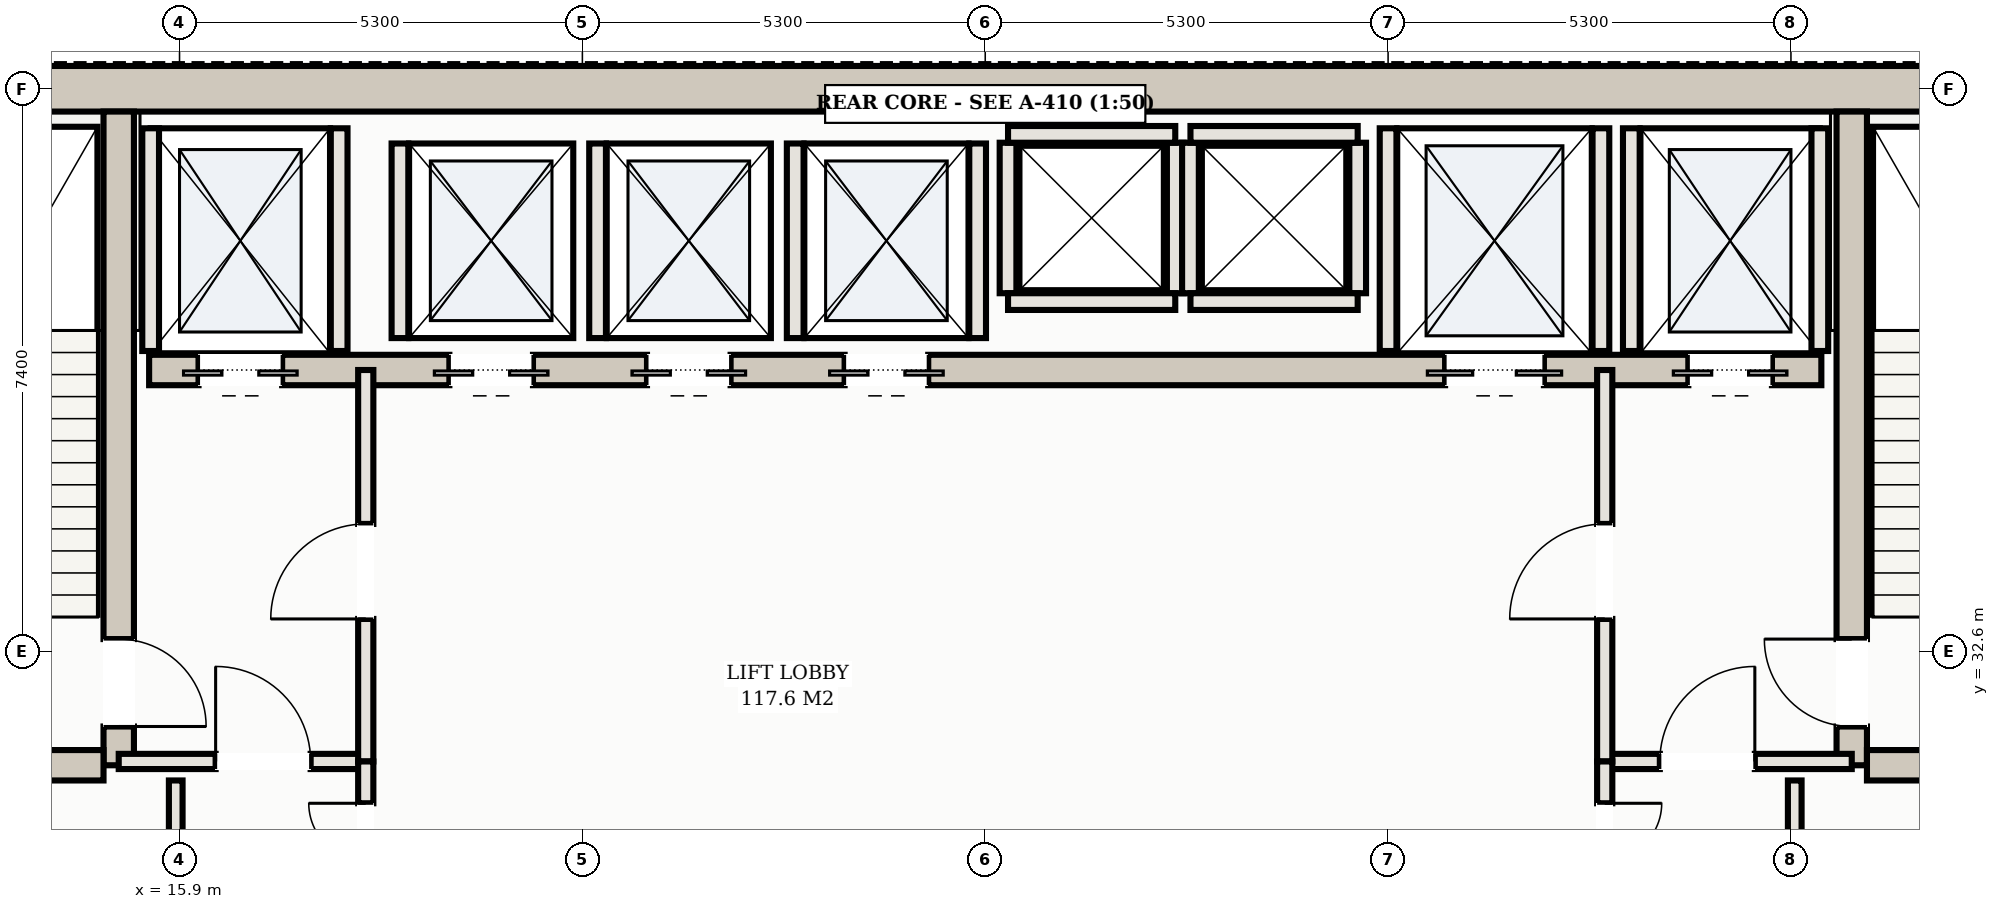
"""IFC4 building model, lengths in metres.
Left out: names, types, materials, properties, quantities, classifications, styles, units other than length and angle.
Written with IfcOpenShell. Run it as: python <this file> out.ifc"""

import sys

from ifc_helpers import new_model, si_unit, direction, frame, frame_2d, origin, place, context, subcontext, project, spatial, rectangle, extrude, element, fill, save


model = new_model("IFC4")
c1 = context("Model", 3, precision=1e-05, world=origin(), true_north=direction((0.0, 1.0)))
c2 = subcontext(c1, "Body", "Model", "MODEL_VIEW")
j1 = project(units=[si_unit("LENGTHUNIT", "METRE"), si_unit("PLANEANGLEUNIT", "RADIAN")], contexts=[c1])
p1 = place(None, origin())
s1 = spatial("IfcSite", under=j1, at=p1, CompositionType="ELEMENT")
p2 = place(p1, origin())
s2 = spatial("IfcBuilding", under=s1, at=p2, CompositionType="ELEMENT")
p3 = place(p2, frame((0.0, 0.0, 134.7)))
s3 = spatial("IfcBuildingStorey", under=s2, at=p3, CompositionType="ELEMENT", Elevation=134.7)
p4 = place(p3, frame((10.3, 40.0, 0.0), z_axis=(0.0, 0.0, 1.0), x_axis=(1.0, 0.0, 0.0)))
e1 = element("IfcWall", 1, at=p4, inside=s3, PredefinedType="SHEAR", context=c2, shape_type="SweptSolid", body=[
    extrude(rectangle(XDim=32.4, YDim=0.6, at=frame_2d((16.2, 0.0))), origin(), (0.0, 0.0, 1.0), 4.3),
])
p5 = place(p3, frame((15.1, 31.1, 0.0), z_axis=(0.0, 0.0, 1.0), x_axis=(0.0, 1.0, 0.0)))
e2 = element("IfcWall", 2, at=p5, inside=s3, PredefinedType="SHEAR", context=c2, shape_type="SweptSolid", body=[
    extrude(rectangle(XDim=8.6, YDim=0.4, at=frame_2d((4.3, 0.0))), origin(), (0.0, 0.0, 1.0), 4.3),
])
p6 = place(p5, frame((0.51, 0.0, 0.0)))
e3 = element("IfcOpeningElement", 3, at=p6, cuts=e2, PredefinedType="OPENING", context=c2, shape_type="SweptSolid", body=[
    extrude(rectangle(XDim=1.15, YDim=2.2, at=frame_2d((0.575, 1.1))), frame((0.0, 0.21, 0.0), z_axis=(0.0, -1.0, 0.0), x_axis=(1.0, 0.0, 0.0)), (0.0, 0.0, 1.0), 0.42),
])
p7 = place(p3, frame((10.9, 31.1, 0.0), z_axis=(0.0, 0.0, 1.0), x_axis=(1.0, 0.0, 0.0)))
e4 = element("IfcWall", 4, at=p7, inside=s3, PredefinedType="SHEAR", context=c2, shape_type="SweptSolid", body=[
    extrude(rectangle(XDim=4.0, YDim=0.4, at=frame_2d((2.0, 0.0))), origin(), (0.0, 0.0, 1.0), 4.3),
])
p8 = place(p3, frame((37.9, 31.1, 0.0), z_axis=(0.0, 0.0, 1.0), x_axis=(0.0, 1.0, 0.0)))
e5 = element("IfcWall", 5, at=p8, inside=s3, PredefinedType="SHEAR", context=c2, shape_type="SweptSolid", body=[
    extrude(rectangle(XDim=8.6, YDim=0.4, at=frame_2d((4.3, 0.0))), origin(), (0.0, 0.0, 1.0), 4.3),
])
p9 = place(p8, frame((0.51, 0.0, 0.0)))
e6 = element("IfcOpeningElement", 6, at=p9, cuts=e5, PredefinedType="OPENING", context=c2, shape_type="SweptSolid", body=[
    extrude(rectangle(XDim=1.15, YDim=2.2, at=frame_2d((0.575, 1.1))), frame((0.0, 0.21, 0.0), z_axis=(0.0, -1.0, 0.0), x_axis=(1.0, 0.0, 0.0)), (0.0, 0.0, 1.0), 0.42),
])
p10 = place(p3, frame((38.1, 31.1, 0.0), z_axis=(0.0, 0.0, 1.0), x_axis=(1.0, 0.0, 0.0)))
e7 = element("IfcWall", 7, at=p10, inside=s3, PredefinedType="SHEAR", context=c2, shape_type="SweptSolid", body=[
    extrude(rectangle(XDim=4.0, YDim=0.4, at=frame_2d((2.0, 0.0))), origin(), (0.0, 0.0, 1.0), 4.3),
])
p11 = place(p3, frame((15.5, 36.3, 0.0), z_axis=(0.0, 0.0, 1.0), x_axis=(1.0, 0.0, 0.0)))
e8 = element("IfcWall", 8, at=p11, inside=s3, PredefinedType="SHEAR", context=c2, shape_type="SweptSolid", body=[
    extrude(rectangle(XDim=22.0, YDim=0.4, at=frame_2d((11.0, 0.0))), origin(), (0.0, 0.0, 1.0), 4.3),
])
p12 = place(p11, frame((0.65, 0.0, 0.0)))
e9 = element("IfcOpeningElement", 9, at=p12, cuts=e8, PredefinedType="OPENING", context=c2, shape_type="SweptSolid", body=[
    extrude(rectangle(XDim=1.1, YDim=2.15, at=frame_2d((0.55, 1.075))), frame((0.0, 0.21, 0.0), z_axis=(0.0, -1.0, 0.0), x_axis=(1.0, 0.0, 0.0)), (0.0, 0.0, 1.0), 0.42),
])
p13 = place(p11, frame((20.25, 0.0, 0.0)))
e10 = element("IfcOpeningElement", 10, at=p13, cuts=e8, PredefinedType="OPENING", context=c2, shape_type="SweptSolid", body=[
    extrude(rectangle(XDim=1.1, YDim=2.15, at=frame_2d((0.55, 1.075))), frame((0.0, 0.21, 0.0), z_axis=(0.0, -1.0, 0.0), x_axis=(1.0, 0.0, 0.0)), (0.0, 0.0, 1.0), 0.42),
])
p14 = place(p11, frame((17.05, 0.0, 0.0)))
e11 = element("IfcOpeningElement", 11, at=p14, cuts=e8, PredefinedType="OPENING", context=c2, shape_type="SweptSolid", body=[
    extrude(rectangle(XDim=1.3, YDim=2.2, at=frame_2d((0.65, 1.1))), frame((0.0, 0.21, 0.0), z_axis=(0.0, -1.0, 0.0), x_axis=(1.0, 0.0, 0.0)), (0.0, 0.0, 1.0), 0.42),
])
p15 = place(p11, frame((3.95, 0.0, 0.0)))
e12 = element("IfcOpeningElement", 12, at=p15, cuts=e8, PredefinedType="OPENING", context=c2, shape_type="SweptSolid", body=[
    extrude(rectangle(XDim=1.1, YDim=2.15, at=frame_2d((0.55, 1.075))), frame((0.0, 0.21, 0.0), z_axis=(0.0, -1.0, 0.0), x_axis=(1.0, 0.0, 0.0)), (0.0, 0.0, 1.0), 0.42),
])
p16 = place(p11, frame((6.55, 0.0, 0.0)))
e13 = element("IfcOpeningElement", 13, at=p16, cuts=e8, PredefinedType="OPENING", context=c2, shape_type="SweptSolid", body=[
    extrude(rectangle(XDim=1.1, YDim=2.15, at=frame_2d((0.55, 1.075))), frame((0.0, 0.21, 0.0), z_axis=(0.0, -1.0, 0.0), x_axis=(1.0, 0.0, 0.0)), (0.0, 0.0, 1.0), 0.42),
])
p17 = place(p11, frame((9.15, 0.0, 0.0)))
e14 = element("IfcOpeningElement", 14, at=p17, cuts=e8, PredefinedType="OPENING", context=c2, shape_type="SweptSolid", body=[
    extrude(rectangle(XDim=1.1, YDim=2.15, at=frame_2d((0.55, 1.075))), frame((0.0, 0.21, 0.0), z_axis=(0.0, -1.0, 0.0), x_axis=(1.0, 0.0, 0.0)), (0.0, 0.0, 1.0), 0.42),
])
for number, where, z_axis, x_axis in (
    (15, (15.52, 36.55, 0.0), (0.0, 0.0, 1.0), (0.0, 1.0, 0.0)),
    (16, (18.0, 36.55, 0.0), (0.0, 0.0, 1.0), (0.0, 1.0, 0.0)),
    (17, (35.0, 36.55, 0.0), (0.0, 0.0, 1.0), (0.0, 1.0, 0.0)),
    (18, (37.48, 36.55, 0.0), (0.0, 0.0, 1.0), (0.0, 1.0, 0.0)),
    (19, (31.8, 36.55, 0.0), (0.0, 0.0, 1.0), (0.0, 1.0, 0.0)),
    (20, (34.6, 36.55, 0.0), (0.0, 0.0, 1.0), (0.0, 1.0, 0.0)),
):
    element("IfcWall", number, at=place(p3, frame(where, z_axis=z_axis, x_axis=x_axis)), inside=s3, PredefinedType="SOLIDWALL", context=c2, shape_type="SweptSolid", body=[
        extrude(rectangle(XDim=2.93, YDim=0.22, at=frame_2d((1.465, 0.0))), origin(), (0.0, 0.0, 1.0), 4.3),
    ])
for number, where, z_axis, x_axis in (
    (21, (18.8, 36.72, 0.0), (0.0, 0.0, 1.0), (0.0, 1.0, 0.0)),
    (22, (21.4, 36.72, 0.0), (0.0, 0.0, 1.0), (0.0, 1.0, 0.0)),
    (23, (24.0, 36.72, 0.0), (0.0, 0.0, 1.0), (0.0, 1.0, 0.0)),
    (24, (26.4, 36.72, 0.0), (0.0, 0.0, 1.0), (0.0, 1.0, 0.0)),
):
    element("IfcWall", number, at=place(p3, frame(where, z_axis=z_axis, x_axis=x_axis)), inside=s3, PredefinedType="SOLIDWALL", context=c2, shape_type="SweptSolid", body=[
        extrude(rectangle(XDim=2.56, YDim=0.22, at=frame_2d((1.28, 0.0))), origin(), (0.0, 0.0, 1.0), 4.3),
    ])
for number, where, z_axis, x_axis in (
    (25, (26.8, 37.31, 0.0), (0.0, 0.0, 1.0), (0.0, 1.0, 0.0)),
    (26, (29.0, 37.31, 0.0), (0.0, 0.0, 1.0), (0.0, 1.0, 0.0)),
):
    element("IfcWall", number, at=place(p3, frame(where, z_axis=z_axis, x_axis=x_axis)), inside=s3, PredefinedType="SOLIDWALL", context=c2, shape_type="SweptSolid", body=[
        extrude(rectangle(XDim=1.98, YDim=0.22, at=frame_2d((0.99, 0.0))), origin(), (0.0, 0.0, 1.0), 4.3),
    ])
for number, where, z_axis, x_axis in (
    (27, (26.8, 39.4, 0.0), (0.0, 0.0, 1.0), (1.0, 0.0, 0.0)),
    (28, (26.8, 37.2, 0.0), (0.0, 0.0, 1.0), (1.0, 0.0, 0.0)),
):
    element("IfcWall", number, at=place(p3, frame(where, z_axis=z_axis, x_axis=x_axis)), inside=s3, PredefinedType="SOLIDWALL", context=c2, shape_type="SweptSolid", body=[
        extrude(rectangle(XDim=2.2, YDim=0.22, at=frame_2d((1.1, 0.0))), origin(), (0.0, 0.0, 1.0), 4.3),
    ])
for number, where, z_axis, x_axis in (
    (29, (29.2, 37.31, 0.0), (0.0, 0.0, 1.0), (0.0, 1.0, 0.0)),
    (30, (31.4, 37.31, 0.0), (0.0, 0.0, 1.0), (0.0, 1.0, 0.0)),
):
    element("IfcWall", number, at=place(p3, frame(where, z_axis=z_axis, x_axis=x_axis)), inside=s3, PredefinedType="SOLIDWALL", context=c2, shape_type="SweptSolid", body=[
        extrude(rectangle(XDim=1.98, YDim=0.22, at=frame_2d((0.99, 0.0))), origin(), (0.0, 0.0, 1.0), 4.3),
    ])
for number, where, z_axis, x_axis in (
    (31, (29.2, 39.4, 0.0), (0.0, 0.0, 1.0), (1.0, 0.0, 0.0)),
    (32, (29.2, 37.2, 0.0), (0.0, 0.0, 1.0), (1.0, 0.0, 0.0)),
):
    element("IfcWall", number, at=place(p3, frame(where, z_axis=z_axis, x_axis=x_axis)), inside=s3, PredefinedType="SOLIDWALL", context=c2, shape_type="SweptSolid", body=[
        extrude(rectangle(XDim=2.2, YDim=0.22, at=frame_2d((1.1, 0.0))), origin(), (0.0, 0.0, 1.0), 4.3),
    ])
p18 = place(p3, frame((15.1, 31.15, 0.0), z_axis=(0.0, 0.0, 1.0), x_axis=(1.0, 0.0, 0.0)))
e33 = element("IfcWall", 33, at=p18, inside=s3, PredefinedType="PARTITIONING", context=c2, shape_type="SweptSolid", body=[
    extrude(rectangle(XDim=3.25, YDim=0.2, at=frame_2d((1.625, 0.0))), origin(), (0.0, 0.0, 1.0), 4.3),
])
p19 = place(p18, frame((1.275, 0.0, 0.0)))
e34 = element("IfcOpeningElement", 34, at=p19, cuts=e33, PredefinedType="OPENING", context=c2, shape_type="SweptSolid", body=[
    extrude(rectangle(XDim=1.25, YDim=2.2, at=frame_2d((0.625, 1.1))), frame((0.0, 0.11, 0.0), z_axis=(0.0, -1.0, 0.0), x_axis=(1.0, 0.0, 0.0)), (0.0, 0.0, 1.0), 0.22),
])
p20 = place(p3, frame((18.35, 31.15, 0.0), z_axis=(0.0, 0.0, 1.0), x_axis=(0.0, 1.0, 0.0)))
e35 = element("IfcWall", 35, at=p20, inside=s3, PredefinedType="PARTITIONING", context=c2, shape_type="SweptSolid", body=[
    extrude(rectangle(XDim=5.15, YDim=0.2, at=frame_2d((2.575, 0.0))), origin(), (0.0, 0.0, 1.0), 4.3),
])
p21 = place(p20, frame((1.875, 0.0, 0.0)))
e36 = element("IfcOpeningElement", 36, at=p21, cuts=e35, PredefinedType="OPENING", context=c2, shape_type="SweptSolid", body=[
    extrude(rectangle(XDim=1.25, YDim=2.2, at=frame_2d((0.625, 1.1))), frame((0.0, 0.11, 0.0), z_axis=(0.0, -1.0, 0.0), x_axis=(1.0, 0.0, 0.0)), (0.0, 0.0, 1.0), 0.22),
])
p22 = place(p3, frame((34.65, 31.15, 0.0), z_axis=(0.0, 0.0, 1.0), x_axis=(1.0, 0.0, 0.0)))
e37 = element("IfcWall", 37, at=p22, inside=s3, PredefinedType="PARTITIONING", context=c2, shape_type="SweptSolid", body=[
    extrude(rectangle(XDim=3.25, YDim=0.2, at=frame_2d((1.625, 0.0))), origin(), (0.0, 0.0, 1.0), 4.3),
])
p23 = place(p22, frame((0.725, 0.0, 0.0)))
e38 = element("IfcOpeningElement", 38, at=p23, cuts=e37, PredefinedType="OPENING", context=c2, shape_type="SweptSolid", body=[
    extrude(rectangle(XDim=1.25, YDim=2.2, at=frame_2d((0.625, 1.1))), frame((0.0, 0.11, 0.0), z_axis=(0.0, -1.0, 0.0), x_axis=(1.0, 0.0, 0.0)), (0.0, 0.0, 1.0), 0.22),
])
p24 = place(p3, frame((34.65, 31.15, 0.0), z_axis=(0.0, 0.0, 1.0), x_axis=(0.0, 1.0, 0.0)))
e39 = element("IfcWall", 39, at=p24, inside=s3, PredefinedType="PARTITIONING", context=c2, shape_type="SweptSolid", body=[
    extrude(rectangle(XDim=5.15, YDim=0.2, at=frame_2d((2.575, 0.0))), origin(), (0.0, 0.0, 1.0), 4.3),
])
p25 = place(p24, frame((1.875, 0.0, 0.0)))
e40 = element("IfcOpeningElement", 40, at=p25, cuts=e39, PredefinedType="OPENING", context=c2, shape_type="SweptSolid", body=[
    extrude(rectangle(XDim=1.25, YDim=2.2, at=frame_2d((0.625, 1.1))), frame((0.0, 0.11, 0.0), z_axis=(0.0, -1.0, 0.0), x_axis=(1.0, 0.0, 0.0)), (0.0, 0.0, 1.0), 0.22),
])
p26 = place(p3, frame((15.85, 25.5, 0.0), z_axis=(0.0, 0.0, 1.0), x_axis=(0.0, 1.0, 0.0)))
e41 = element("IfcWall", 41, at=p26, inside=s3, PredefinedType="PARTITIONING", context=c2, shape_type="SweptSolid", body=[
    extrude(rectangle(XDim=5.4, YDim=0.18, at=frame_2d((2.7, 0.0))), origin(), (0.0, 0.0, 1.0), 4.3),
])
p27 = place(p26, frame((2.24, 0.0, 0.0)))
e42 = element("IfcOpeningElement", 42, at=p27, cuts=e41, PredefinedType="OPENING", context=c2, shape_type="SweptSolid", body=[
    extrude(rectangle(XDim=0.92, YDim=2.15, at=frame_2d((0.46, 1.075))), frame((0.0, 0.1, 0.0), z_axis=(0.0, -1.0, 0.0), x_axis=(1.0, 0.0, 0.0)), (0.0, 0.0, 1.0), 0.2),
])
p28 = place(p3, frame((37.15, 25.5, 0.0), z_axis=(0.0, 0.0, 1.0), x_axis=(0.0, 1.0, 0.0)))
e43 = element("IfcWall", 43, at=p28, inside=s3, PredefinedType="PARTITIONING", context=c2, shape_type="SweptSolid", body=[
    extrude(rectangle(XDim=5.4, YDim=0.18, at=frame_2d((2.7, 0.0))), origin(), (0.0, 0.0, 1.0), 4.3),
])
p29 = place(p28, frame((2.24, 0.0, 0.0)))
e44 = element("IfcOpeningElement", 44, at=p29, cuts=e43, PredefinedType="OPENING", context=c2, shape_type="SweptSolid", body=[
    extrude(rectangle(XDim=0.92, YDim=2.15, at=frame_2d((0.46, 1.075))), frame((0.0, 0.1, 0.0), z_axis=(0.0, -1.0, 0.0), x_axis=(1.0, 0.0, 0.0)), (0.0, 0.0, 1.0), 0.2),
])
p30 = place(p3, frame((18.35, 28.55, 0.0), z_axis=(0.0, 0.0, 1.0), x_axis=(0.0, 1.0, 0.0)))
e45 = element("IfcWall", 45, at=p30, inside=s3, PredefinedType="PARTITIONING", context=c2, shape_type="SweptSolid", body=[
    extrude(rectangle(XDim=2.6, YDim=0.2, at=frame_2d((1.3, 0.0))), origin(), (0.0, 0.0, 1.0), 4.3),
])
p31 = place(p30, frame((0.55, 0.0, 0.0)))
e46 = element("IfcOpeningElement", 46, at=p31, cuts=e45, PredefinedType="OPENING", context=c2, shape_type="SweptSolid", body=[
    extrude(rectangle(XDim=1.5, YDim=2.25, at=frame_2d((0.75, 1.125))), frame((0.0, 0.11, 0.0), z_axis=(0.0, -1.0, 0.0), x_axis=(1.0, 0.0, 0.0)), (0.0, 0.0, 1.0), 0.22),
])
p32 = place(p3, frame((34.65, 28.55, 0.0), z_axis=(0.0, 0.0, 1.0), x_axis=(0.0, 1.0, 0.0)))
e47 = element("IfcWall", 47, at=p32, inside=s3, PredefinedType="PARTITIONING", context=c2, shape_type="SweptSolid", body=[
    extrude(rectangle(XDim=2.6, YDim=0.2, at=frame_2d((1.3, 0.0))), origin(), (0.0, 0.0, 1.0), 4.3),
])
p33 = place(p32, frame((0.55, 0.0, 0.0)))
e48 = element("IfcOpeningElement", 48, at=p33, cuts=e47, PredefinedType="OPENING", context=c2, shape_type="SweptSolid", body=[
    extrude(rectangle(XDim=1.5, YDim=2.25, at=frame_2d((0.75, 1.125))), frame((0.0, 0.11, 0.0), z_axis=(0.0, -1.0, 0.0), x_axis=(1.0, 0.0, 0.0)), (0.0, 0.0, 1.0), 0.22),
])
p34 = place(p12, frame((1.1, 0.0, 0.0), z_axis=(0.0, 0.0, 1.0), x_axis=(-1.0, 0.0, 0.0)))
e49 = element("IfcDoor", 49, at=p34, inside=s3, OperationType="DOUBLE_DOOR_SLIDING", PredefinedType="DOOR", context=c2, shape_type="SweptSolid", body=[
    extrude(rectangle(XDim=1.1, YDim=2.15, at=frame_2d((0.55, 1.075))), frame((0.0, 0.025, 0.0), z_axis=(0.0, -1.0, 0.0), x_axis=(1.0, 0.0, 0.0)), (0.0, 0.0, 1.0), 0.05),
])
fill(e9, e49)
p35 = place(p13, frame((1.1, 0.0, 0.0), z_axis=(0.0, 0.0, 1.0), x_axis=(-1.0, 0.0, 0.0)))
e50 = element("IfcDoor", 50, at=p35, inside=s3, OperationType="DOUBLE_DOOR_SLIDING", PredefinedType="DOOR", context=c2, shape_type="SweptSolid", body=[
    extrude(rectangle(XDim=1.1, YDim=2.15, at=frame_2d((0.55, 1.075))), frame((0.0, 0.025, 0.0), z_axis=(0.0, -1.0, 0.0), x_axis=(1.0, 0.0, 0.0)), (0.0, 0.0, 1.0), 0.05),
])
fill(e10, e50)
p36 = place(p14, frame((1.3, 0.0, 0.0), z_axis=(0.0, 0.0, 1.0), x_axis=(-1.0, 0.0, 0.0)))
e51 = element("IfcDoor", 51, at=p36, inside=s3, OperationType="DOUBLE_DOOR_SLIDING", PredefinedType="DOOR", context=c2, shape_type="SweptSolid", body=[
    extrude(rectangle(XDim=1.3, YDim=2.2, at=frame_2d((0.65, 1.1))), frame((0.0, 0.025, 0.0), z_axis=(0.0, -1.0, 0.0), x_axis=(1.0, 0.0, 0.0)), (0.0, 0.0, 1.0), 0.05),
])
fill(e11, e51)
p37 = place(p15, frame((1.1, 0.0, 0.0), z_axis=(0.0, 0.0, 1.0), x_axis=(-1.0, 0.0, 0.0)))
e52 = element("IfcDoor", 52, at=p37, inside=s3, OperationType="DOUBLE_DOOR_SLIDING", PredefinedType="DOOR", context=c2, shape_type="SweptSolid", body=[
    extrude(rectangle(XDim=1.1, YDim=2.15, at=frame_2d((0.55, 1.075))), frame((0.0, 0.025, 0.0), z_axis=(0.0, -1.0, 0.0), x_axis=(1.0, 0.0, 0.0)), (0.0, 0.0, 1.0), 0.05),
])
fill(e12, e52)
p38 = place(p16, frame((1.1, 0.0, 0.0), z_axis=(0.0, 0.0, 1.0), x_axis=(-1.0, 0.0, 0.0)))
e53 = element("IfcDoor", 53, at=p38, inside=s3, OperationType="DOUBLE_DOOR_SLIDING", PredefinedType="DOOR", context=c2, shape_type="SweptSolid", body=[
    extrude(rectangle(XDim=1.1, YDim=2.15, at=frame_2d((0.55, 1.075))), frame((0.0, 0.025, 0.0), z_axis=(0.0, -1.0, 0.0), x_axis=(1.0, 0.0, 0.0)), (0.0, 0.0, 1.0), 0.05),
])
fill(e13, e53)
p39 = place(p17, frame((1.1, 0.0, 0.0), z_axis=(0.0, 0.0, 1.0), x_axis=(-1.0, 0.0, 0.0)))
e54 = element("IfcDoor", 54, at=p39, inside=s3, OperationType="DOUBLE_DOOR_SLIDING", PredefinedType="DOOR", context=c2, shape_type="SweptSolid", body=[
    extrude(rectangle(XDim=1.1, YDim=2.15, at=frame_2d((0.55, 1.075))), frame((0.0, 0.025, 0.0), z_axis=(0.0, -1.0, 0.0), x_axis=(1.0, 0.0, 0.0)), (0.0, 0.0, 1.0), 0.05),
])
fill(e14, e54)
p40 = place(p19, origin())
e55 = element("IfcDoor", 55, at=p40, inside=s3, OperationType="SINGLE_SWING_LEFT", PredefinedType="DOOR", context=c2, shape_type="SweptSolid", body=[
    extrude(rectangle(XDim=1.25, YDim=2.2, at=frame_2d((0.625, 1.1))), frame((0.0, 0.025, 0.0), z_axis=(0.0, -1.0, 0.0), x_axis=(1.0, 0.0, 0.0)), (0.0, 0.0, 1.0), 0.05),
])
fill(e34, e55)
p41 = place(p21, origin())
e56 = element("IfcDoor", 56, at=p41, inside=s3, OperationType="SINGLE_SWING_LEFT", PredefinedType="DOOR", context=c2, shape_type="SweptSolid", body=[
    extrude(rectangle(XDim=1.25, YDim=2.2, at=frame_2d((0.625, 1.1))), frame((0.0, 0.025, 0.0), z_axis=(0.0, -1.0, 0.0), x_axis=(1.0, 0.0, 0.0)), (0.0, 0.0, 1.0), 0.05),
])
fill(e36, e56)
p42 = place(p23, origin())
e57 = element("IfcDoor", 57, at=p42, inside=s3, OperationType="SINGLE_SWING_RIGHT", PredefinedType="DOOR", context=c2, shape_type="SweptSolid", body=[
    extrude(rectangle(XDim=1.25, YDim=2.2, at=frame_2d((0.625, 1.1))), frame((0.0, 0.025, 0.0), z_axis=(0.0, -1.0, 0.0), x_axis=(1.0, 0.0, 0.0)), (0.0, 0.0, 1.0), 0.05),
])
fill(e38, e57)
p43 = place(p25, origin())
e58 = element("IfcDoor", 58, at=p43, inside=s3, OperationType="SINGLE_SWING_LEFT", PredefinedType="DOOR", context=c2, shape_type="SweptSolid", body=[
    extrude(rectangle(XDim=1.25, YDim=2.2, at=frame_2d((0.625, 1.1))), frame((0.0, 0.025, 0.0), z_axis=(0.0, -1.0, 0.0), x_axis=(1.0, 0.0, 0.0)), (0.0, 0.0, 1.0), 0.05),
])
fill(e40, e58)
p44 = place(p6, frame((1.15, 0.0, 0.0), z_axis=(0.0, 0.0, 1.0), x_axis=(-1.0, 0.0, 0.0)))
e59 = element("IfcDoor", 59, at=p44, inside=s3, OperationType="SINGLE_SWING_RIGHT", PredefinedType="DOOR", context=c2, shape_type="SweptSolid", body=[
    extrude(rectangle(XDim=1.15, YDim=2.2, at=frame_2d((0.575, 1.1))), frame((0.0, 0.025, 0.0), z_axis=(0.0, -1.0, 0.0), x_axis=(1.0, 0.0, 0.0)), (0.0, 0.0, 1.0), 0.05),
])
fill(e3, e59)
p45 = place(p9, origin())
e60 = element("IfcDoor", 60, at=p45, inside=s3, OperationType="SINGLE_SWING_RIGHT", PredefinedType="DOOR", context=c2, shape_type="SweptSolid", body=[
    extrude(rectangle(XDim=1.15, YDim=2.2, at=frame_2d((0.575, 1.1))), frame((0.0, 0.025, 0.0), z_axis=(0.0, -1.0, 0.0), x_axis=(1.0, 0.0, 0.0)), (0.0, 0.0, 1.0), 0.05),
])
fill(e6, e60)
p46 = place(p31, origin())
e61 = element("IfcDoor", 61, at=p46, inside=s3, OperationType="DOUBLE_DOOR_SINGLE_SWING", PredefinedType="DOOR", context=c2, shape_type="SweptSolid", body=[
    extrude(rectangle(XDim=1.5, YDim=2.25, at=frame_2d((0.75, 1.125))), frame((0.0, 0.025, 0.0), z_axis=(0.0, -1.0, 0.0), x_axis=(1.0, 0.0, 0.0)), (0.0, 0.0, 1.0), 0.05),
])
fill(e46, e61)
p47 = place(p33, frame((1.5, 0.0, 0.0), z_axis=(0.0, 0.0, 1.0), x_axis=(-1.0, 0.0, 0.0)))
e62 = element("IfcDoor", 62, at=p47, inside=s3, OperationType="DOUBLE_DOOR_SINGLE_SWING", PredefinedType="DOOR", context=c2, shape_type="SweptSolid", body=[
    extrude(rectangle(XDim=1.5, YDim=2.25, at=frame_2d((0.75, 1.125))), frame((0.0, 0.025, 0.0), z_axis=(0.0, -1.0, 0.0), x_axis=(1.0, 0.0, 0.0)), (0.0, 0.0, 1.0), 0.05),
])
fill(e48, e62)
save(model, sys.argv[1])
